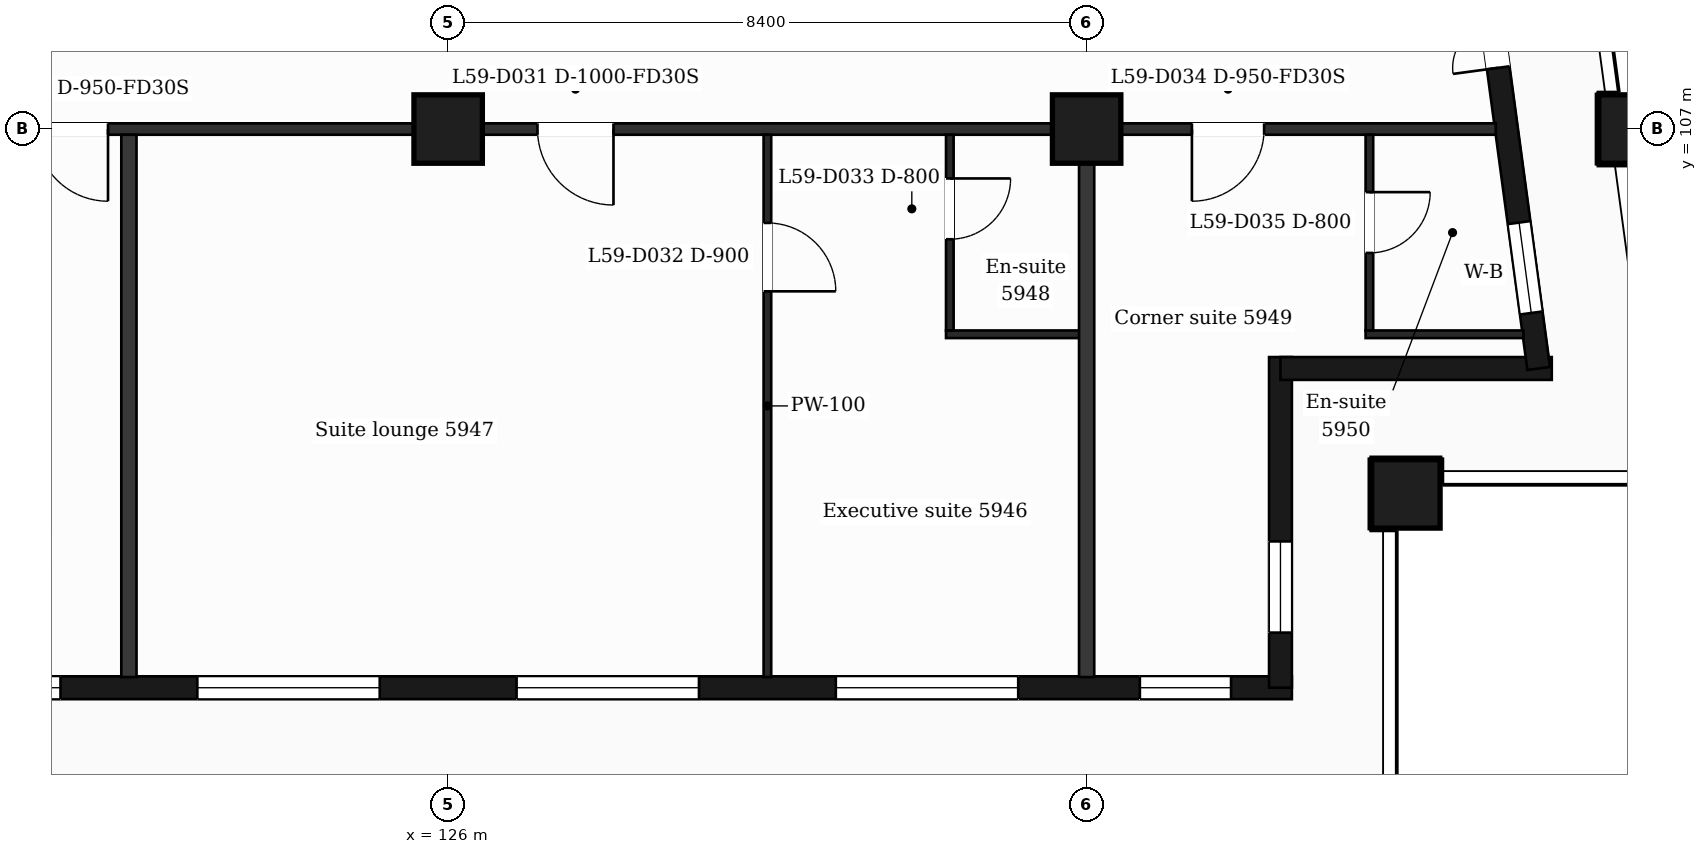
"""IFC4 building model, lengths in metres.
Left out: names, types, materials, properties, quantities, classifications, styles, units other than length and angle.
Written with IfcOpenShell. Run it as: python <this file> out.ifc"""

import sys

from ifc_helpers import new_model, si_unit, direction, frame, frame_2d, origin, origin_2d, place, context, subcontext, project, spatial, rectangle, extrude, element, fill, save


model = new_model("IFC4")
c1 = context("Model", 3, precision=1e-05, world=origin(), true_north=direction((0.0, 1.0)))
c2 = subcontext(c1, "Body", "Model", "MODEL_VIEW")
j1 = project(units=[si_unit("LENGTHUNIT", "METRE"), si_unit("PLANEANGLEUNIT", "RADIAN")], contexts=[c1])
p1 = place(None, origin())
s1 = spatial("IfcSite", under=j1, at=p1, CompositionType="ELEMENT")
p2 = place(p1, origin())
s2 = spatial("IfcBuilding", under=s1, at=p2, CompositionType="ELEMENT")
p3 = place(p2, frame((0.0, 0.0, 242.9)))
s3 = spatial("IfcBuildingStorey", under=s2, at=p3, CompositionType="ELEMENT", Elevation=242.9)
for number, where, z_axis, x_axis in (
    (1, (138.6, 102.2, 0.0), (0.0, 0.0, 1.0), (1.0, 0.0, 0.0)),
    (2, (126.0, 107.0, 0.0), (0.0, 0.0, 1.0), (1.0, 0.0, 0.0)),
    (3, (134.4, 107.0, 0.0), (0.0, 0.0, 1.0), (1.0, 0.0, 0.0)),
    (4, (141.588, 107.0, 0.0), (0.0, 0.0, 1.0), (1.0, 0.0, 0.0)),
):
    element("IfcColumn", number, at=place(p3, frame(where, z_axis=z_axis, x_axis=x_axis)), inside=s3, PredefinedType="COLUMN", context=c2, shape_type="SweptSolid", body=[
        extrude(rectangle(XDim=0.9, YDim=0.9, at=origin_2d()), origin(), (0.0, 0.0, 1.0), 3.7),
    ])
p4 = place(p3, frame((89.85, 99.65, 0.0), z_axis=(0.0, 0.0, 1.0), x_axis=(1.0, 0.0, 0.0)))
e5 = element("IfcWall", 5, at=p4, inside=s3, PredefinedType="SOLIDWALL", context=c2, shape_type="SweptSolid", body=[
    extrude(rectangle(XDim=47.25, YDim=0.3, at=frame_2d((23.625, 0.0))), origin(), (0.0, 0.0, 1.0), 3.2),
])
p5 = place(p4, frame((0.725, 0.0, 0.9)))
e6 = element("IfcOpeningElement", 6, at=p5, cuts=e5, PredefinedType="OPENING", context=c2, shape_type="SweptSolid", body=[
    extrude(rectangle(XDim=1.2, YDim=2.1, at=frame_2d((0.6, 1.05))), frame((0.0, 0.16, 0.0), z_axis=(0.0, -1.0, 0.0), x_axis=(1.0, 0.0, 0.0)), (0.0, 0.0, 1.0), 0.32),
])
p6 = place(p4, frame((3.45, 0.0, 0.9)))
e7 = element("IfcOpeningElement", 7, at=p6, cuts=e5, PredefinedType="OPENING", context=c2, shape_type="SweptSolid", body=[
    extrude(rectangle(XDim=2.4, YDim=2.1, at=frame_2d((1.2, 1.05))), frame((0.0, 0.16, 0.0), z_axis=(0.0, -1.0, 0.0), x_axis=(1.0, 0.0, 0.0)), (0.0, 0.0, 1.0), 0.32),
])
p7 = place(p4, frame((7.35, 0.0, 0.0)))
e8 = element("IfcOpeningElement", 8, at=p7, cuts=e5, PredefinedType="OPENING", context=c2, shape_type="SweptSolid", body=[
    extrude(rectangle(XDim=1.2, YDim=2.4, at=frame_2d((0.6, 1.2))), frame((0.0, 0.16, 0.0), z_axis=(0.0, -1.0, 0.0), x_axis=(1.0, 0.0, 0.0)), (0.0, 0.0, 1.0), 0.32),
])
p8 = place(p4, frame((9.15, 0.0, 0.9)))
e9 = element("IfcOpeningElement", 9, at=p8, cuts=e5, PredefinedType="OPENING", context=c2, shape_type="SweptSolid", body=[
    extrude(rectangle(XDim=1.2, YDim=2.1, at=frame_2d((0.6, 1.05))), frame((0.0, 0.16, 0.0), z_axis=(0.0, -1.0, 0.0), x_axis=(1.0, 0.0, 0.0)), (0.0, 0.0, 1.0), 0.32),
])
p9 = place(p4, frame((11.85, 0.0, 0.9)))
e10 = element("IfcOpeningElement", 10, at=p9, cuts=e5, PredefinedType="OPENING", context=c2, shape_type="SweptSolid", body=[
    extrude(rectangle(XDim=2.4, YDim=2.1, at=frame_2d((1.2, 1.05))), frame((0.0, 0.16, 0.0), z_axis=(0.0, -1.0, 0.0), x_axis=(1.0, 0.0, 0.0)), (0.0, 0.0, 1.0), 0.32),
])
p10 = place(p4, frame((16.05, 0.0, 0.9)))
e11 = element("IfcOpeningElement", 11, at=p10, cuts=e5, PredefinedType="OPENING", context=c2, shape_type="SweptSolid", body=[
    extrude(rectangle(XDim=2.4, YDim=2.1, at=frame_2d((1.2, 1.05))), frame((0.0, 0.16, 0.0), z_axis=(0.0, -1.0, 0.0), x_axis=(1.0, 0.0, 0.0)), (0.0, 0.0, 1.0), 0.32),
])
p11 = place(p4, frame((20.85, 0.0, 0.9)))
e12 = element("IfcOpeningElement", 12, at=p11, cuts=e5, PredefinedType="OPENING", context=c2, shape_type="SweptSolid", body=[
    extrude(rectangle(XDim=1.2, YDim=2.1, at=frame_2d((0.6, 1.05))), frame((0.0, 0.16, 0.0), z_axis=(0.0, -1.0, 0.0), x_axis=(1.0, 0.0, 0.0)), (0.0, 0.0, 1.0), 0.32),
])
p12 = place(p4, frame((25.05, 0.0, 0.9)))
e13 = element("IfcOpeningElement", 13, at=p12, cuts=e5, PredefinedType="OPENING", context=c2, shape_type="SweptSolid", body=[
    extrude(rectangle(XDim=1.2, YDim=2.1, at=frame_2d((0.6, 1.05))), frame((0.0, 0.16, 0.0), z_axis=(0.0, -1.0, 0.0), x_axis=(1.0, 0.0, 0.0)), (0.0, 0.0, 1.0), 0.32),
])
p13 = place(p4, frame((28.65, 0.0, 0.9)))
e14 = element("IfcOpeningElement", 14, at=p13, cuts=e5, PredefinedType="OPENING", context=c2, shape_type="SweptSolid", body=[
    extrude(rectangle(XDim=2.4, YDim=2.1, at=frame_2d((1.2, 1.05))), frame((0.0, 0.16, 0.0), z_axis=(0.0, -1.0, 0.0), x_axis=(1.0, 0.0, 0.0)), (0.0, 0.0, 1.0), 0.32),
])
p14 = place(p4, frame((32.85, 0.0, 0.9)))
e15 = element("IfcOpeningElement", 15, at=p14, cuts=e5, PredefinedType="OPENING", context=c2, shape_type="SweptSolid", body=[
    extrude(rectangle(XDim=2.4, YDim=2.1, at=frame_2d((1.2, 1.05))), frame((0.0, 0.16, 0.0), z_axis=(0.0, -1.0, 0.0), x_axis=(1.0, 0.0, 0.0)), (0.0, 0.0, 1.0), 0.32),
])
p15 = place(p4, frame((37.05, 0.0, 0.9)))
e16 = element("IfcOpeningElement", 16, at=p15, cuts=e5, PredefinedType="OPENING", context=c2, shape_type="SweptSolid", body=[
    extrude(rectangle(XDim=2.4, YDim=2.1, at=frame_2d((1.2, 1.05))), frame((0.0, 0.16, 0.0), z_axis=(0.0, -1.0, 0.0), x_axis=(1.0, 0.0, 0.0)), (0.0, 0.0, 1.0), 0.32),
])
p16 = place(p4, frame((41.25, 0.0, 0.9)))
e17 = element("IfcOpeningElement", 17, at=p16, cuts=e5, PredefinedType="OPENING", context=c2, shape_type="SweptSolid", body=[
    extrude(rectangle(XDim=2.4, YDim=2.1, at=frame_2d((1.2, 1.05))), frame((0.0, 0.16, 0.0), z_axis=(0.0, -1.0, 0.0), x_axis=(1.0, 0.0, 0.0)), (0.0, 0.0, 1.0), 0.32),
])
p17 = place(p4, frame((45.25, 0.0, 0.9)))
e18 = element("IfcOpeningElement", 18, at=p17, cuts=e5, PredefinedType="OPENING", context=c2, shape_type="SweptSolid", body=[
    extrude(rectangle(XDim=1.2, YDim=2.1, at=frame_2d((0.6, 1.05))), frame((0.0, 0.16, 0.0), z_axis=(0.0, -1.0, 0.0), x_axis=(1.0, 0.0, 0.0)), (0.0, 0.0, 1.0), 0.32),
])
p18 = place(p3, frame((136.95, 99.65, 0.0), z_axis=(0.0, 0.0, 1.0), x_axis=(0.0, 1.0, 0.0)))
e19 = element("IfcWall", 19, at=p18, inside=s3, PredefinedType="SOLIDWALL", context=c2, shape_type="SweptSolid", body=[
    extrude(rectangle(XDim=4.35, YDim=0.3, at=frame_2d((2.175, 0.0))), origin(), (0.0, 0.0, 1.0), 3.2),
])
p19 = place(p18, frame((0.725, 0.0, 0.9)))
e20 = element("IfcOpeningElement", 20, at=p19, cuts=e19, PredefinedType="OPENING", context=c2, shape_type="SweptSolid", body=[
    extrude(rectangle(XDim=1.2, YDim=2.1, at=frame_2d((0.6, 1.05))), frame((0.0, 0.16, 0.0), z_axis=(0.0, -1.0, 0.0), x_axis=(1.0, 0.0, 0.0)), (0.0, 0.0, 1.0), 0.32),
])
p20 = place(p3, frame((136.95, 103.85, 0.0), z_axis=(0.0, 0.0, 1.0), x_axis=(1.0, 0.0, 0.0)))
e21 = element("IfcWall", 21, at=p20, inside=s3, PredefinedType="SOLIDWALL", context=c2, shape_type="SweptSolid", body=[
    extrude(rectangle(XDim=3.569, YDim=0.3, at=frame_2d((1.785, 0.0))), origin(), (0.0, 0.0, 1.0), 3.2),
])
p21 = place(p3, frame((140.348, 103.85, 0.0), z_axis=(0.0, 0.0, 1.0), x_axis=(-0.133431549479, 0.991058031401, 0.0)))
e22 = element("IfcWall", 22, at=p21, inside=s3, PredefinedType="SOLIDWALL", context=c2, shape_type="SweptSolid", body=[
    extrude(rectangle(XDim=6.609, YDim=0.3, at=frame_2d((3.304, 0.0))), origin(), (0.0, 0.0, 1.0), 3.2),
])
p22 = place(p21, frame((0.737, 0.0, 0.9)))
e23 = element("IfcOpeningElement", 23, at=p22, cuts=e22, PredefinedType="OPENING", context=c2, shape_type="SweptSolid", body=[
    extrude(rectangle(XDim=1.2, YDim=2.1, at=frame_2d((0.6, 1.05))), frame((0.0, 0.16, 0.0), z_axis=(0.0, -1.0, 0.0), x_axis=(1.0, 0.0, 0.0)), (0.0, 0.0, 1.0), 0.32),
])
p23 = place(p21, frame((3.991, 0.0, 0.0)))
e24 = element("IfcOpeningElement", 24, at=p23, cuts=e22, PredefinedType="OPENING", context=c2, shape_type="SweptSolid", body=[
    extrude(rectangle(XDim=1.2, YDim=2.4, at=frame_2d((0.6, 1.2))), frame((0.0, 0.16, 0.0), z_axis=(0.0, -1.0, 0.0), x_axis=(1.0, 0.0, 0.0)), (0.0, 0.0, 1.0), 0.32),
])
p24 = place(p3, frame((132.55, 104.3, 0.0), z_axis=(0.0, 0.0, 1.0), x_axis=(1.0, 0.0, 0.0)))
e25 = element("IfcWall", 25, at=p24, inside=s3, PredefinedType="PARTITIONING", context=c2, shape_type="SweptSolid", body=[
    extrude(rectangle(XDim=1.85, YDim=0.1, at=frame_2d((0.925, 0.0))), origin(), (0.0, 0.0, 1.0), 3.2),
])
p25 = place(p3, frame((138.07, 104.3, 0.0), z_axis=(0.0, 0.0, 1.0), x_axis=(1.0, 0.0, 0.0)))
e26 = element("IfcWall", 26, at=p25, inside=s3, PredefinedType="PARTITIONING", context=c2, shape_type="SweptSolid", body=[
    extrude(rectangle(XDim=2.076, YDim=0.1, at=frame_2d((1.038, 0.0))), origin(), (0.0, 0.0, 1.0), 3.2),
])
p26 = place(p3, frame((87.018, 107.0, 0.0), z_axis=(0.0, 0.0, 1.0), x_axis=(1.0, 0.0, 0.0)))
e27 = element("IfcWall", 27, at=p26, inside=s3, PredefinedType="PARTITIONING", context=c2, shape_type="SweptSolid", body=[
    extrude(rectangle(XDim=52.765, YDim=0.15, at=frame_2d((26.382, 0.0))), origin(), (0.0, 0.0, 1.0), 3.2),
])
p27 = place(p26, frame((0.87, 0.0, 0.0)))
e28 = element("IfcOpeningElement", 28, at=p27, cuts=e27, PredefinedType="OPENING", context=c2, shape_type="SweptSolid", body=[
    extrude(rectangle(XDim=0.95, YDim=2.1, at=frame_2d((0.475, 1.05))), frame((0.0, 0.085, 0.0), z_axis=(0.0, -1.0, 0.0), x_axis=(1.0, 0.0, 0.0)), (0.0, 0.0, 1.0), 0.17),
])
p28 = place(p26, frame((7.757, 0.0, 0.0)))
e29 = element("IfcOpeningElement", 29, at=p28, cuts=e27, PredefinedType="OPENING", context=c2, shape_type="SweptSolid", body=[
    extrude(rectangle(XDim=0.95, YDim=2.1, at=frame_2d((0.475, 1.05))), frame((0.0, 0.085, 0.0), z_axis=(0.0, -1.0, 0.0), x_axis=(1.0, 0.0, 0.0)), (0.0, 0.0, 1.0), 0.17),
])
p29 = place(p26, frame((16.57, 0.0, 0.0)))
e30 = element("IfcOpeningElement", 30, at=p29, cuts=e27, PredefinedType="OPENING", context=c2, shape_type="SweptSolid", body=[
    extrude(rectangle(XDim=0.95, YDim=2.1, at=frame_2d((0.475, 1.05))), frame((0.0, 0.085, 0.0), z_axis=(0.0, -1.0, 0.0), x_axis=(1.0, 0.0, 0.0)), (0.0, 0.0, 1.0), 0.17),
])
p30 = place(p26, frame((18.782, 0.0, 0.0)))
e31 = element("IfcOpeningElement", 31, at=p30, cuts=e27, PredefinedType="OPENING", context=c2, shape_type="SweptSolid", body=[
    extrude(rectangle(XDim=0.95, YDim=2.1, at=frame_2d((0.475, 1.05))), frame((0.0, 0.085, 0.0), z_axis=(0.0, -1.0, 0.0), x_axis=(1.0, 0.0, 0.0)), (0.0, 0.0, 1.0), 0.17),
])
p31 = place(p26, frame((24.519, 0.0, 0.0)))
e32 = element("IfcOpeningElement", 32, at=p31, cuts=e27, PredefinedType="OPENING", context=c2, shape_type="SweptSolid", body=[
    extrude(rectangle(XDim=0.95, YDim=2.1, at=frame_2d((0.475, 1.05))), frame((0.0, 0.085, 0.0), z_axis=(0.0, -1.0, 0.0), x_axis=(1.0, 0.0, 0.0)), (0.0, 0.0, 1.0), 0.17),
])
p32 = place(p26, frame((26.919, 0.0, 0.0)))
e33 = element("IfcOpeningElement", 33, at=p32, cuts=e27, PredefinedType="OPENING", context=c2, shape_type="SweptSolid", body=[
    extrude(rectangle(XDim=0.95, YDim=2.1, at=frame_2d((0.475, 1.05))), frame((0.0, 0.085, 0.0), z_axis=(0.0, -1.0, 0.0), x_axis=(1.0, 0.0, 0.0)), (0.0, 0.0, 1.0), 0.17),
])
p33 = place(p26, frame((33.557, 0.0, 0.0)))
e34 = element("IfcOpeningElement", 34, at=p33, cuts=e27, PredefinedType="OPENING", context=c2, shape_type="SweptSolid", body=[
    extrude(rectangle(XDim=0.95, YDim=2.1, at=frame_2d((0.475, 1.05))), frame((0.0, 0.085, 0.0), z_axis=(0.0, -1.0, 0.0), x_axis=(1.0, 0.0, 0.0)), (0.0, 0.0, 1.0), 0.17),
])
p34 = place(p26, frame((40.157, 0.0, 0.0)))
e35 = element("IfcOpeningElement", 35, at=p34, cuts=e27, PredefinedType="OPENING", context=c2, shape_type="SweptSolid", body=[
    extrude(rectangle(XDim=1.0, YDim=2.1, at=frame_2d((0.5, 1.05))), frame((0.0, 0.085, 0.0), z_axis=(0.0, -1.0, 0.0), x_axis=(1.0, 0.0, 0.0)), (0.0, 0.0, 1.0), 0.17),
])
p35 = place(p26, frame((48.767, 0.0, 0.0)))
e36 = element("IfcOpeningElement", 36, at=p35, cuts=e27, PredefinedType="OPENING", context=c2, shape_type="SweptSolid", body=[
    extrude(rectangle(XDim=0.95, YDim=2.1, at=frame_2d((0.475, 1.05))), frame((0.0, 0.085, 0.0), z_axis=(0.0, -1.0, 0.0), x_axis=(1.0, 0.0, 0.0)), (0.0, 0.0, 1.0), 0.17),
])
p36 = place(p3, frame((121.8, 99.79, 0.0), z_axis=(0.0, 0.0, 1.0), x_axis=(0.0, 1.0, 0.0)))
e37 = element("IfcWall", 37, at=p36, inside=s3, PredefinedType="PARTITIONING", context=c2, shape_type="SweptSolid", body=[
    extrude(rectangle(XDim=7.135, YDim=0.2, at=frame_2d((3.567, 0.0))), origin(), (0.0, 0.0, 1.0), 3.2),
])
p37 = place(p3, frame((130.2, 99.79, 0.0), z_axis=(0.0, 0.0, 1.0), x_axis=(0.0, 1.0, 0.0)))
e38 = element("IfcWall", 38, at=p37, inside=s3, PredefinedType="PARTITIONING", context=c2, shape_type="SweptSolid", body=[
    extrude(rectangle(XDim=7.135, YDim=0.1, at=frame_2d((3.567, 0.0))), origin(), (0.0, 0.0, 1.0), 3.2),
])
p38 = place(p37, frame((5.075, 0.0, 0.0)))
e39 = element("IfcOpeningElement", 39, at=p38, cuts=e38, PredefinedType="OPENING", context=c2, shape_type="SweptSolid", body=[
    extrude(rectangle(XDim=0.9, YDim=2.1, at=frame_2d((0.45, 1.05))), frame((0.0, 0.06, 0.0), z_axis=(0.0, -1.0, 0.0), x_axis=(1.0, 0.0, 0.0)), (0.0, 0.0, 1.0), 0.12),
])
p39 = place(p3, frame((132.6, 104.35, 0.0), z_axis=(0.0, 0.0, 1.0), x_axis=(0.0, 1.0, 0.0)))
e40 = element("IfcWall", 40, at=p39, inside=s3, PredefinedType="PARTITIONING", context=c2, shape_type="SweptSolid", body=[
    extrude(rectangle(XDim=2.575, YDim=0.1, at=frame_2d((1.288, 0.0))), origin(), (0.0, 0.0, 1.0), 3.2),
])
p40 = place(p39, frame((1.2, 0.0, 0.0)))
e41 = element("IfcOpeningElement", 41, at=p40, cuts=e40, PredefinedType="OPENING", context=c2, shape_type="SweptSolid", body=[
    extrude(rectangle(XDim=0.8, YDim=2.1, at=frame_2d((0.4, 1.05))), frame((0.0, 0.06, 0.0), z_axis=(0.0, -1.0, 0.0), x_axis=(1.0, 0.0, 0.0)), (0.0, 0.0, 1.0), 0.12),
])
p41 = place(p3, frame((134.4, 99.79, 0.0), z_axis=(0.0, 0.0, 1.0), x_axis=(0.0, 1.0, 0.0)))
e42 = element("IfcWall", 42, at=p41, inside=s3, PredefinedType="PARTITIONING", context=c2, shape_type="SweptSolid", body=[
    extrude(rectangle(XDim=7.135, YDim=0.2, at=frame_2d((3.567, 0.0))), origin(), (0.0, 0.0, 1.0), 3.2),
])
p42 = place(p3, frame((138.12, 104.35, 0.0), z_axis=(0.0, 0.0, 1.0), x_axis=(0.0, 1.0, 0.0)))
e43 = element("IfcWall", 43, at=p42, inside=s3, PredefinedType="PARTITIONING", context=c2, shape_type="SweptSolid", body=[
    extrude(rectangle(XDim=2.575, YDim=0.1, at=frame_2d((1.288, 0.0))), origin(), (0.0, 0.0, 1.0), 3.2),
])
p43 = place(p42, frame((1.02, 0.0, 0.0)))
e44 = element("IfcOpeningElement", 44, at=p43, cuts=e43, PredefinedType="OPENING", context=c2, shape_type="SweptSolid", body=[
    extrude(rectangle(XDim=0.8, YDim=2.1, at=frame_2d((0.4, 1.05))), frame((0.0, 0.06, 0.0), z_axis=(0.0, -1.0, 0.0), x_axis=(1.0, 0.0, 0.0)), (0.0, 0.0, 1.0), 0.12),
])
p44 = place(p13, origin())
e45 = element("IfcWindow", 45, at=p44, inside=s3, PartitioningType="SINGLE_PANEL", PredefinedType="WINDOW", context=c2, shape_type="SweptSolid", body=[
    extrude(rectangle(XDim=2.4, YDim=2.1, at=frame_2d((1.2, 1.05))), frame((0.0, 0.03, 0.0), z_axis=(0.0, -1.0, 0.0), x_axis=(1.0, 0.0, 0.0)), (0.0, 0.0, 1.0), 0.06),
])
fill(e14, e45)
p45 = place(p14, origin())
e46 = element("IfcWindow", 46, at=p45, inside=s3, PartitioningType="SINGLE_PANEL", PredefinedType="WINDOW", context=c2, shape_type="SweptSolid", body=[
    extrude(rectangle(XDim=2.4, YDim=2.1, at=frame_2d((1.2, 1.05))), frame((0.0, 0.03, 0.0), z_axis=(0.0, -1.0, 0.0), x_axis=(1.0, 0.0, 0.0)), (0.0, 0.0, 1.0), 0.06),
])
fill(e15, e46)
p46 = place(p15, origin())
e47 = element("IfcWindow", 47, at=p46, inside=s3, PartitioningType="SINGLE_PANEL", PredefinedType="WINDOW", context=c2, shape_type="SweptSolid", body=[
    extrude(rectangle(XDim=2.4, YDim=2.1, at=frame_2d((1.2, 1.05))), frame((0.0, 0.03, 0.0), z_axis=(0.0, -1.0, 0.0), x_axis=(1.0, 0.0, 0.0)), (0.0, 0.0, 1.0), 0.06),
])
fill(e16, e47)
p47 = place(p16, origin())
e48 = element("IfcWindow", 48, at=p47, inside=s3, PartitioningType="SINGLE_PANEL", PredefinedType="WINDOW", context=c2, shape_type="SweptSolid", body=[
    extrude(rectangle(XDim=2.4, YDim=2.1, at=frame_2d((1.2, 1.05))), frame((0.0, 0.03, 0.0), z_axis=(0.0, -1.0, 0.0), x_axis=(1.0, 0.0, 0.0)), (0.0, 0.0, 1.0), 0.06),
])
fill(e17, e48)
p48 = place(p17, origin())
e49 = element("IfcWindow", 49, at=p48, inside=s3, PartitioningType="SINGLE_PANEL", PredefinedType="WINDOW", context=c2, shape_type="SweptSolid", body=[
    extrude(rectangle(XDim=1.2, YDim=2.1, at=frame_2d((0.6, 1.05))), frame((0.0, 0.03, 0.0), z_axis=(0.0, -1.0, 0.0), x_axis=(1.0, 0.0, 0.0)), (0.0, 0.0, 1.0), 0.06),
])
fill(e18, e49)
p49 = place(p19, origin())
e50 = element("IfcWindow", 50, at=p49, inside=s3, PartitioningType="SINGLE_PANEL", PredefinedType="WINDOW", context=c2, shape_type="SweptSolid", body=[
    extrude(rectangle(XDim=1.2, YDim=2.1, at=frame_2d((0.6, 1.05))), frame((0.0, 0.03, 0.0), z_axis=(0.0, -1.0, 0.0), x_axis=(1.0, 0.0, 0.0)), (0.0, 0.0, 1.0), 0.06),
])
fill(e20, e50)
p50 = place(p22, origin())
e51 = element("IfcWindow", 51, at=p50, inside=s3, PartitioningType="SINGLE_PANEL", PredefinedType="WINDOW", context=c2, shape_type="SweptSolid", body=[
    extrude(rectangle(XDim=1.2, YDim=2.1, at=frame_2d((0.6, 1.05))), frame((0.0, 0.03, 0.0), z_axis=(0.0, -1.0, 0.0), x_axis=(1.0, 0.0, 0.0)), (0.0, 0.0, 1.0), 0.06),
])
fill(e23, e51)
p51 = place(p23, origin())
e52 = element("IfcDoor", 52, at=p51, inside=s3, OperationType="DOUBLE_DOOR_SINGLE_SWING", PredefinedType="DOOR", context=c2, shape_type="SweptSolid", body=[
    extrude(rectangle(XDim=1.2, YDim=2.4, at=frame_2d((0.6, 1.2))), frame((0.0, 0.025, 0.0), z_axis=(0.0, -1.0, 0.0), x_axis=(1.0, 0.0, 0.0)), (0.0, 0.0, 1.0), 0.05),
])
fill(e24, e52)
p52 = place(p33, origin())
e53 = element("IfcDoor", 53, at=p52, inside=s3, OperationType="SINGLE_SWING_RIGHT", PredefinedType="DOOR", context=c2, shape_type="SweptSolid", body=[
    extrude(rectangle(XDim=0.95, YDim=2.1, at=frame_2d((0.475, 1.05))), frame((0.0, 0.025, 0.0), z_axis=(0.0, -1.0, 0.0), x_axis=(1.0, 0.0, 0.0)), (0.0, 0.0, 1.0), 0.05),
])
fill(e34, e53)
p53 = place(p34, origin())
e54 = element("IfcDoor", 54, at=p53, inside=s3, OperationType="SINGLE_SWING_RIGHT", PredefinedType="DOOR", context=c2, shape_type="SweptSolid", body=[
    extrude(rectangle(XDim=1.0, YDim=2.1, at=frame_2d((0.5, 1.05))), frame((0.0, 0.025, 0.0), z_axis=(0.0, -1.0, 0.0), x_axis=(1.0, 0.0, 0.0)), (0.0, 0.0, 1.0), 0.05),
])
fill(e35, e54)
p54 = place(p38, origin())
e55 = element("IfcDoor", 55, at=p54, inside=s3, OperationType="SINGLE_SWING_LEFT", PredefinedType="DOOR", context=c2, shape_type="SweptSolid", body=[
    extrude(rectangle(XDim=0.9, YDim=2.1, at=frame_2d((0.45, 1.05))), frame((0.0, 0.025, 0.0), z_axis=(0.0, -1.0, 0.0), x_axis=(1.0, 0.0, 0.0)), (0.0, 0.0, 1.0), 0.05),
])
fill(e39, e55)
p55 = place(p40, origin())
e56 = element("IfcDoor", 56, at=p55, inside=s3, OperationType="SINGLE_SWING_RIGHT", PredefinedType="DOOR", context=c2, shape_type="SweptSolid", body=[
    extrude(rectangle(XDim=0.8, YDim=2.1, at=frame_2d((0.4, 1.05))), frame((0.0, 0.025, 0.0), z_axis=(0.0, -1.0, 0.0), x_axis=(1.0, 0.0, 0.0)), (0.0, 0.0, 1.0), 0.05),
])
fill(e41, e56)
p56 = place(p35, origin())
e57 = element("IfcDoor", 57, at=p56, inside=s3, OperationType="SINGLE_SWING_LEFT", PredefinedType="DOOR", context=c2, shape_type="SweptSolid", body=[
    extrude(rectangle(XDim=0.95, YDim=2.1, at=frame_2d((0.475, 1.05))), frame((0.0, 0.025, 0.0), z_axis=(0.0, -1.0, 0.0), x_axis=(1.0, 0.0, 0.0)), (0.0, 0.0, 1.0), 0.05),
])
fill(e36, e57)
p57 = place(p43, origin())
e58 = element("IfcDoor", 58, at=p57, inside=s3, OperationType="SINGLE_SWING_RIGHT", PredefinedType="DOOR", context=c2, shape_type="SweptSolid", body=[
    extrude(rectangle(XDim=0.8, YDim=2.1, at=frame_2d((0.4, 1.05))), frame((0.0, 0.025, 0.0), z_axis=(0.0, -1.0, 0.0), x_axis=(1.0, 0.0, 0.0)), (0.0, 0.0, 1.0), 0.05),
])
fill(e44, e58)
save(model, sys.argv[1])
